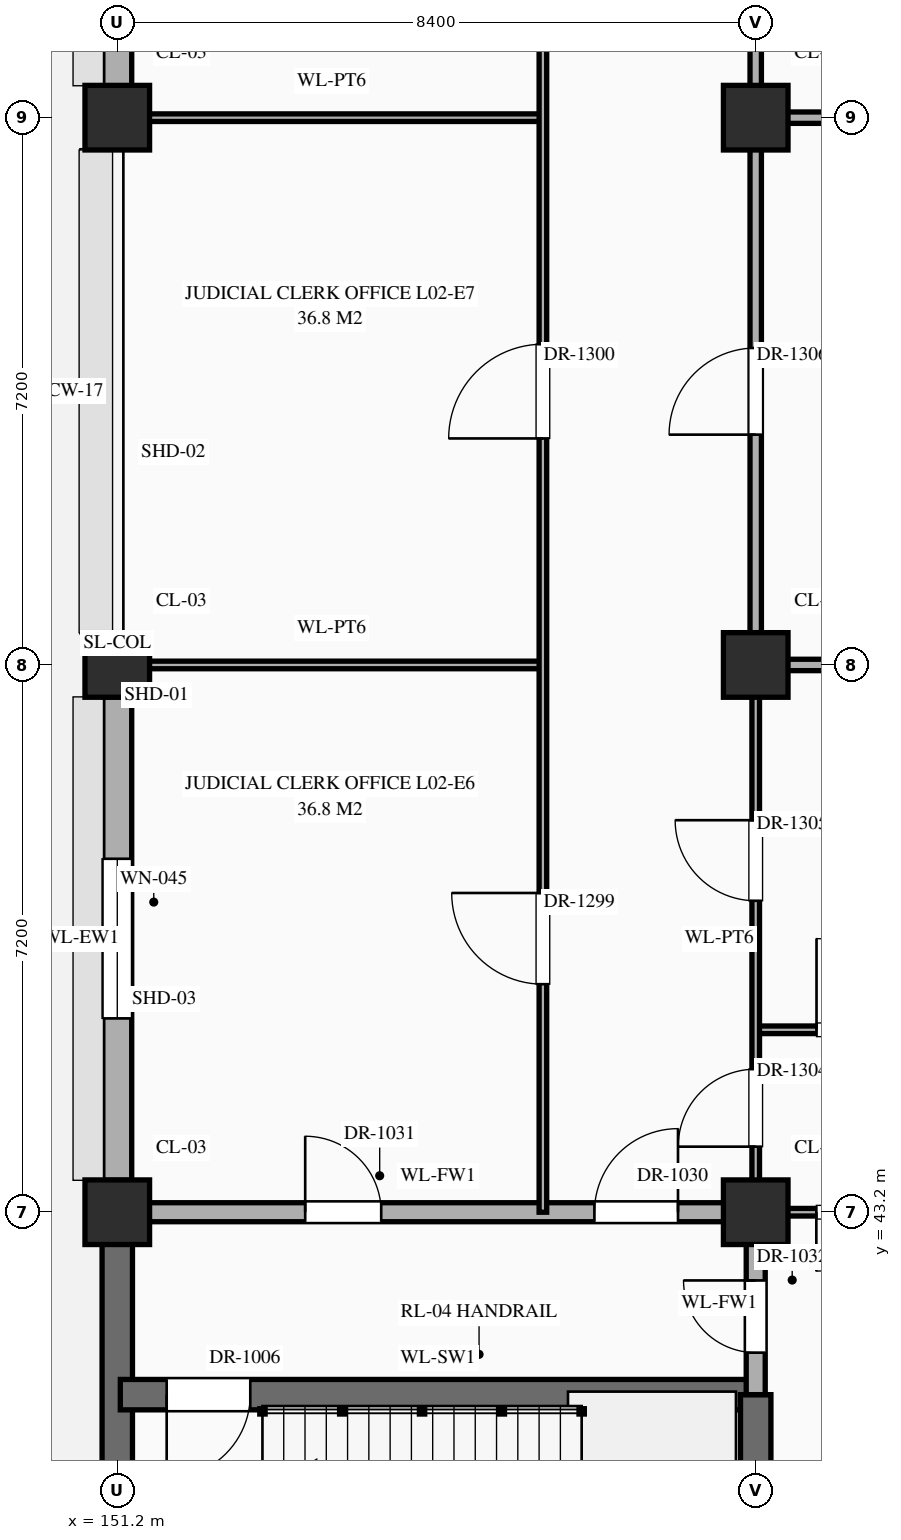
"""IFC4 building model, lengths in metres.
Left out: names, types, materials, properties, quantities, classifications, styles, units other than length and angle.
Written with IfcOpenShell. Run it as: python <this file> out.ifc"""

import sys

from ifc_helpers import new_model, si_unit, direction, frame, frame_2d, origin, origin_2d, place, context, subcontext, project, spatial, rectangle, extrude, element, fill, save


model = new_model("IFC4")
c1 = context("Model", 3, precision=1e-05, world=origin(), true_north=direction((0.0, 1.0)))
c2 = subcontext(c1, "Body", "Model", "MODEL_VIEW")
j1 = project(units=[si_unit("LENGTHUNIT", "METRE"), si_unit("PLANEANGLEUNIT", "RADIAN")], contexts=[c1])
p1 = place(None, origin())
s1 = spatial("IfcSite", under=j1, at=p1, CompositionType="ELEMENT")
p2 = place(p1, origin())
s2 = spatial("IfcBuilding", under=s1, at=p2, CompositionType="ELEMENT")
p3 = place(p2, frame((0.0, 0.0, 5.4)))
s3 = spatial("IfcBuildingStorey", under=s2, at=p3, CompositionType="ELEMENT", Elevation=5.4)
for number, where, z_axis, x_axis in (
    (1, (151.2, 43.2, 0.0), (0.0, 0.0, 1.0), (1.0, 0.0, 0.0)),
    (2, (151.2, 50.4, 0.0), (0.0, 0.0, 1.0), (1.0, 0.0, 0.0)),
    (3, (151.2, 57.6, 0.0), (0.0, 0.0, 1.0), (1.0, 0.0, 0.0)),
    (4, (159.6, 43.2, 0.0), (0.0, 0.0, 1.0), (1.0, 0.0, 0.0)),
    (5, (159.6, 50.4, 0.0), (0.0, 0.0, 1.0), (1.0, 0.0, 0.0)),
    (6, (159.6, 57.6, 0.0), (0.0, 0.0, 1.0), (1.0, 0.0, 0.0)),
):
    element("IfcColumn", number, at=place(p3, frame(where, z_axis=z_axis, x_axis=x_axis)), inside=s3, PredefinedType="COLUMN", context=c2, shape_type="SweptSolid", body=[
        extrude(rectangle(XDim=0.85, YDim=0.85, at=origin_2d()), origin(), (0.0, 0.0, 1.0), 5.4),
    ])
p4 = place(p3, frame((151.2, 36.42, 0.0), z_axis=(0.0, 0.0, 1.0), x_axis=(0.0, 1.0, 0.0)))
e7 = element("IfcWall", 7, at=p4, inside=s3, PredefinedType="SHEAR", context=c2, shape_type="SweptSolid", body=[
    extrude(rectangle(XDim=6.36, YDim=0.4, at=frame_2d((3.18, 0.0))), origin(), (0.0, 0.0, 1.0), 5.12),
])
p5 = place(p3, frame((151.2, 43.62, 0.0), z_axis=(0.0, 0.0, 1.0), x_axis=(0.0, 1.0, 0.0)))
e8 = element("IfcWall", 8, at=p5, inside=s3, PredefinedType="STANDARD", context=c2, shape_type="SweptSolid", body=[
    extrude(rectangle(XDim=6.36, YDim=0.38, at=frame_2d((3.18, 0.0))), origin(), (0.0, 0.0, 1.0), 4.47),
])
p6 = place(p5, frame((2.13, 0.0, 0.85)))
e9 = element("IfcOpeningElement", 9, at=p6, cuts=e8, PredefinedType="OPENING", context=c2, shape_type="SweptSolid", body=[
    extrude(rectangle(XDim=2.1, YDim=1.56, at=frame_2d((1.05, 0.78))), frame((0.0, 0.202, 0.0), z_axis=(0.0, -1.0, 0.0), x_axis=(1.0, 0.0, 0.0)), (0.0, 0.0, 1.0), 0.404),
])
p7 = place(p3, frame((151.2, 58.02, 0.0), z_axis=(0.0, 0.0, 1.0), x_axis=(0.0, 1.0, 0.0)))
e10 = element("IfcWall", 10, at=p7, inside=s3, PredefinedType="STANDARD", context=c2, shape_type="SweptSolid", body=[
    extrude(rectangle(XDim=6.36, YDim=0.38, at=frame_2d((3.18, 0.0))), origin(), (0.0, 0.0, 1.0), 4.47),
])
p8 = place(p7, frame((2.13, 0.0, 0.85)))
e11 = element("IfcOpeningElement", 11, at=p8, cuts=e10, PredefinedType="OPENING", context=c2, shape_type="SweptSolid", body=[
    extrude(rectangle(XDim=2.1, YDim=1.92, at=frame_2d((1.05, 0.96))), frame((0.0, 0.202, 0.0), z_axis=(0.0, -1.0, 0.0), x_axis=(1.0, 0.0, 0.0)), (0.0, 0.0, 1.0), 0.404),
])
p9 = place(p3, frame((151.24, 40.8, 0.0), z_axis=(0.0, 0.0, 1.0), x_axis=(1.0, 0.0, 0.0)))
e12 = element("IfcWall", 12, at=p9, inside=s3, PredefinedType="SHEAR", context=c2, shape_type="SweptSolid", body=[
    extrude(rectangle(XDim=8.36, YDim=0.4, at=frame_2d((4.18, 0.0))), origin(), (0.0, 0.0, 1.0), 5.12),
])
p10 = place(p9, frame((0.61, 0.0, 0.0)))
e13 = element("IfcOpeningElement", 13, at=p10, cuts=e12, PredefinedType="OPENING", context=c2, shape_type="SweptSolid", body=[
    extrude(rectangle(XDim=1.1, YDim=2.2, at=frame_2d((0.55, 1.1))), frame((0.0, 0.212, 0.0), z_axis=(0.0, -1.0, 0.0), x_axis=(1.0, 0.0, 0.0)), (0.0, 0.0, 1.0), 0.424),
])
p11 = place(p3, frame((151.24, 43.2, 0.0), z_axis=(0.0, 0.0, 1.0), x_axis=(1.0, 0.0, 0.0)))
e14 = element("IfcWall", 14, at=p11, inside=s3, PredefinedType="STANDARD", context=c2, shape_type="SweptSolid", body=[
    extrude(rectangle(XDim=8.36, YDim=0.25, at=frame_2d((4.18, 0.0))), origin(), (0.0, 0.0, 1.0), 4.27),
])
p12 = place(p11, frame((6.238, 0.0, 0.0)))
e15 = element("IfcOpeningElement", 15, at=p12, cuts=e14, PredefinedType="OPENING", context=c2, shape_type="SweptSolid", body=[
    extrude(rectangle(XDim=1.1, YDim=2.2, at=frame_2d((0.55, 1.1))), frame((0.0, 0.137, 0.0), z_axis=(0.0, -1.0, 0.0), x_axis=(1.0, 0.0, 0.0)), (0.0, 0.0, 1.0), 0.274),
])
p13 = place(p11, frame((2.433, 0.0, 0.0)))
e16 = element("IfcOpeningElement", 16, at=p13, cuts=e14, PredefinedType="OPENING", context=c2, shape_type="SweptSolid", body=[
    extrude(rectangle(XDim=1.0, YDim=2.2, at=frame_2d((0.5, 1.1))), frame((0.0, 0.137, 0.0), z_axis=(0.0, -1.0, 0.0), x_axis=(1.0, 0.0, 0.0)), (0.0, 0.0, 1.0), 0.274),
])
p14 = place(p3, frame((159.6, 43.2, 0.0), z_axis=(0.0, 0.0, 1.0), x_axis=(1.0, 0.0, 0.0)))
e17 = element("IfcWall", 17, at=p14, inside=s3, PredefinedType="STANDARD", context=c2, shape_type="SweptSolid", body=[
    extrude(rectangle(XDim=8.36, YDim=0.1, at=frame_2d((4.18, 0.0))), origin(), (0.0, 0.0, 1.0), 4.27),
])
p15 = place(p14, frame((0.798, 0.0, 0.0)))
e18 = element("IfcOpeningElement", 18, at=p15, cuts=e17, PredefinedType="OPENING", context=c2, shape_type="SweptSolid", body=[
    extrude(rectangle(XDim=1.55, YDim=2.35, at=frame_2d((0.775, 1.175))), frame((0.0, 0.062, 0.0), z_axis=(0.0, -1.0, 0.0), x_axis=(1.0, 0.0, 0.0)), (0.0, 0.0, 1.0), 0.124),
])
p16 = place(p3, frame((159.6, 45.6, 0.0), z_axis=(0.0, 0.0, 1.0), x_axis=(1.0, 0.0, 0.0)))
e19 = element("IfcWall", 19, at=p16, inside=s3, PredefinedType="STANDARD", context=c2, shape_type="SweptSolid", body=[
    extrude(rectangle(XDim=8.36, YDim=0.1, at=frame_2d((4.18, 0.0))), origin(), (0.0, 0.0, 1.0), 5.12),
])
p17 = place(p16, frame((0.8, 0.0, 0.0)))
e20 = element("IfcOpeningElement", 20, at=p17, cuts=e19, PredefinedType="OPENING", context=c2, shape_type="SweptSolid", body=[
    extrude(rectangle(XDim=1.2, YDim=2.35, at=frame_2d((0.6, 1.175))), frame((0.0, 0.062, 0.0), z_axis=(0.0, -1.0, 0.0), x_axis=(1.0, 0.0, 0.0)), (0.0, 0.0, 1.0), 0.124),
])
p18 = place(p3, frame((151.24, 50.4, 0.0), z_axis=(0.0, 0.0, 1.0), x_axis=(1.0, 0.0, 0.0)))
e21 = element("IfcWall", 21, at=p18, inside=s3, PredefinedType="STANDARD", context=c2, shape_type="SweptSolid", body=[
    extrude(rectangle(XDim=5.56, YDim=0.1, at=frame_2d((2.78, 0.0))), origin(), (0.0, 0.0, 1.0), 4.27),
])
p19 = place(p3, frame((159.6, 50.4, 0.0), z_axis=(0.0, 0.0, 1.0), x_axis=(1.0, 0.0, 0.0)))
e22 = element("IfcWall", 22, at=p19, inside=s3, PredefinedType="STANDARD", context=c2, shape_type="SweptSolid", body=[
    extrude(rectangle(XDim=8.36, YDim=0.15, at=frame_2d((4.18, 0.0))), origin(), (0.0, 0.0, 1.0), 4.27),
])
p20 = place(p3, frame((151.24, 57.6, 0.0), z_axis=(0.0, 0.0, 1.0), x_axis=(1.0, 0.0, 0.0)))
e23 = element("IfcWall", 23, at=p20, inside=s3, PredefinedType="STANDARD", context=c2, shape_type="SweptSolid", body=[
    extrude(rectangle(XDim=5.56, YDim=0.1, at=frame_2d((2.78, 0.0))), origin(), (0.0, 0.0, 1.0), 4.27),
])
p21 = place(p3, frame((159.6, 57.6, 0.0), z_axis=(0.0, 0.0, 1.0), x_axis=(1.0, 0.0, 0.0)))
e24 = element("IfcWall", 24, at=p21, inside=s3, PredefinedType="STANDARD", context=c2, shape_type="SweptSolid", body=[
    extrude(rectangle(XDim=8.36, YDim=0.15, at=frame_2d((4.18, 0.0))), origin(), (0.0, 0.0, 1.0), 4.27),
])
p22 = place(p3, frame((156.8, 43.2, 0.0), z_axis=(0.0, 0.0, 1.0), x_axis=(0.0, 1.0, 0.0)))
e25 = element("IfcWall", 25, at=p22, inside=s3, PredefinedType="STANDARD", context=c2, shape_type="SweptSolid", body=[
    extrude(rectangle(XDim=40.8, YDim=0.1, at=frame_2d((20.4, 0.0))), origin(), (0.0, 0.0, 1.0), 5.12),
])
p23 = place(p22, frame((37.95, 0.0, 0.0)))
e26 = element("IfcOpeningElement", 26, at=p23, cuts=e25, PredefinedType="OPENING", context=c2, shape_type="SweptSolid", body=[
    extrude(rectangle(XDim=0.9, YDim=2.15, at=frame_2d((0.45, 1.075))), frame((0.0, 0.062, 0.0), z_axis=(0.0, -1.0, 0.0), x_axis=(1.0, 0.0, 0.0)), (0.0, 0.0, 1.0), 0.124),
])
p24 = place(p22, frame((3.0, 0.0, 0.0)))
e27 = element("IfcOpeningElement", 27, at=p24, cuts=e25, PredefinedType="OPENING", context=c2, shape_type="SweptSolid", body=[
    extrude(rectangle(XDim=1.2, YDim=2.35, at=frame_2d((0.6, 1.175))), frame((0.0, 0.062, 0.0), z_axis=(0.0, -1.0, 0.0), x_axis=(1.0, 0.0, 0.0)), (0.0, 0.0, 1.0), 0.124),
])
p25 = place(p22, frame((10.18, 0.0, 0.0)))
e28 = element("IfcOpeningElement", 28, at=p25, cuts=e25, PredefinedType="OPENING", context=c2, shape_type="SweptSolid", body=[
    extrude(rectangle(XDim=1.24, YDim=2.3, at=frame_2d((0.62, 1.15))), frame((0.0, 0.062, 0.0), z_axis=(0.0, -1.0, 0.0), x_axis=(1.0, 0.0, 0.0)), (0.0, 0.0, 1.0), 0.124),
])
p26 = place(p22, frame((17.36, 0.0, 0.0)))
e29 = element("IfcOpeningElement", 29, at=p26, cuts=e25, PredefinedType="OPENING", context=c2, shape_type="SweptSolid", body=[
    extrude(rectangle(XDim=1.28, YDim=2.35, at=frame_2d((0.64, 1.175))), frame((0.0, 0.062, 0.0), z_axis=(0.0, -1.0, 0.0), x_axis=(1.0, 0.0, 0.0)), (0.0, 0.0, 1.0), 0.124),
])
p27 = place(p22, frame((24.73, 0.0, 0.0)))
e30 = element("IfcOpeningElement", 30, at=p27, cuts=e25, PredefinedType="OPENING", context=c2, shape_type="SweptSolid", body=[
    extrude(rectangle(XDim=0.94, YDim=2.3, at=frame_2d((0.47, 1.15))), frame((0.0, 0.062, 0.0), z_axis=(0.0, -1.0, 0.0), x_axis=(1.0, 0.0, 0.0)), (0.0, 0.0, 1.0), 0.124),
])
p28 = place(p22, frame((31.91, 0.0, 0.0)))
e31 = element("IfcOpeningElement", 31, at=p28, cuts=e25, PredefinedType="OPENING", context=c2, shape_type="SweptSolid", body=[
    extrude(rectangle(XDim=0.98, YDim=2.35, at=frame_2d((0.49, 1.175))), frame((0.0, 0.062, 0.0), z_axis=(0.0, -1.0, 0.0), x_axis=(1.0, 0.0, 0.0)), (0.0, 0.0, 1.0), 0.124),
])
p29 = place(p3, frame((159.6, 36.0, 0.0), z_axis=(0.0, 0.0, 1.0), x_axis=(0.0, 1.0, 0.0)))
e32 = element("IfcWall", 32, at=p29, inside=s3, PredefinedType="SHEAR", context=c2, shape_type="SweptSolid", body=[
    extrude(rectangle(XDim=4.8, YDim=0.4, at=frame_2d((2.4, 0.0))), origin(), (0.0, 0.0, 1.0), 5.12),
])
p30 = place(p3, frame((159.6, 40.8, 0.0), z_axis=(0.0, 0.0, 1.0), x_axis=(0.0, 1.0, 0.0)))
e33 = element("IfcWall", 33, at=p30, inside=s3, PredefinedType="STANDARD", context=c2, shape_type="SweptSolid", body=[
    extrude(rectangle(XDim=2.4, YDim=0.25, at=frame_2d((1.2, 0.0))), origin(), (0.0, 0.0, 1.0), 4.37),
])
p31 = place(p30, frame((0.552, 0.0, 0.0)))
e34 = element("IfcOpeningElement", 34, at=p31, cuts=e33, PredefinedType="OPENING", context=c2, shape_type="SweptSolid", body=[
    extrude(rectangle(XDim=0.95, YDim=2.15, at=frame_2d((0.475, 1.075))), frame((0.0, 0.137, 0.0), z_axis=(0.0, -1.0, 0.0), x_axis=(1.0, 0.0, 0.0)), (0.0, 0.0, 1.0), 0.274),
])
p32 = place(p3, frame((159.6, 43.2, 0.0), z_axis=(0.0, 0.0, 1.0), x_axis=(0.0, 1.0, 0.0)))
e35 = element("IfcWall", 35, at=p32, inside=s3, PredefinedType="STANDARD", context=c2, shape_type="SweptSolid", body=[
    extrude(rectangle(XDim=7.2, YDim=0.1, at=frame_2d((3.6, 0.0))), origin(), (0.0, 0.0, 1.0), 4.37),
])
p33 = place(p32, frame((0.863, 0.0, 0.0)))
e36 = element("IfcOpeningElement", 36, at=p33, cuts=e35, PredefinedType="OPENING", context=c2, shape_type="SweptSolid", body=[
    extrude(rectangle(XDim=1.02, YDim=2.4, at=frame_2d((0.51, 1.2))), frame((0.0, 0.062, 0.0), z_axis=(0.0, -1.0, 0.0), x_axis=(1.0, 0.0, 0.0)), (0.0, 0.0, 1.0), 0.124),
])
p34 = place(p32, frame((4.097, 0.0, 0.0)))
e37 = element("IfcOpeningElement", 37, at=p34, cuts=e35, PredefinedType="OPENING", context=c2, shape_type="SweptSolid", body=[
    extrude(rectangle(XDim=1.06, YDim=2.4, at=frame_2d((0.53, 1.2))), frame((0.0, 0.062, 0.0), z_axis=(0.0, -1.0, 0.0), x_axis=(1.0, 0.0, 0.0)), (0.0, 0.0, 1.0), 0.124),
])
p35 = place(p3, frame((159.6, 50.4, 0.0), z_axis=(0.0, 0.0, 1.0), x_axis=(0.0, 1.0, 0.0)))
e38 = element("IfcWall", 38, at=p35, inside=s3, PredefinedType="STANDARD", context=c2, shape_type="SweptSolid", body=[
    extrude(rectangle(XDim=33.6, YDim=0.15, at=frame_2d((16.8, 0.0))), origin(), (0.0, 0.0, 1.0), 4.37),
])
p36 = place(p35, frame((30.942, 0.0, 0.0)))
e39 = element("IfcOpeningElement", 39, at=p36, cuts=e38, PredefinedType="OPENING", context=c2, shape_type="SweptSolid", body=[
    extrude(rectangle(XDim=0.86, YDim=2.1, at=frame_2d((0.43, 1.05))), frame((0.0, 0.087, 0.0), z_axis=(0.0, -1.0, 0.0), x_axis=(1.0, 0.0, 0.0)), (0.0, 0.0, 1.0), 0.174),
])
p37 = place(p35, frame((3.03, 0.0, 0.0)))
e40 = element("IfcOpeningElement", 40, at=p37, cuts=e38, PredefinedType="OPENING", context=c2, shape_type="SweptSolid", body=[
    extrude(rectangle(XDim=1.14, YDim=2.4, at=frame_2d((0.57, 1.2))), frame((0.0, 0.087, 0.0), z_axis=(0.0, -1.0, 0.0), x_axis=(1.0, 0.0, 0.0)), (0.0, 0.0, 1.0), 0.174),
])
p38 = place(p35, frame((10.35, 0.0, 0.0)))
e41 = element("IfcOpeningElement", 41, at=p38, cuts=e38, PredefinedType="OPENING", context=c2, shape_type="SweptSolid", body=[
    extrude(rectangle(XDim=0.9, YDim=2.15, at=frame_2d((0.45, 1.075))), frame((0.0, 0.087, 0.0), z_axis=(0.0, -1.0, 0.0), x_axis=(1.0, 0.0, 0.0)), (0.0, 0.0, 1.0), 0.174),
])
p39 = place(p35, frame((17.57, 0.0, 0.0)))
e42 = element("IfcOpeningElement", 42, at=p39, cuts=e38, PredefinedType="OPENING", context=c2, shape_type="SweptSolid", body=[
    extrude(rectangle(XDim=0.86, YDim=2.1, at=frame_2d((0.43, 1.05))), frame((0.0, 0.087, 0.0), z_axis=(0.0, -1.0, 0.0), x_axis=(1.0, 0.0, 0.0)), (0.0, 0.0, 1.0), 0.174),
])
p40 = place(p35, frame((24.74, 0.0, 0.0)))
e43 = element("IfcOpeningElement", 43, at=p40, cuts=e38, PredefinedType="OPENING", context=c2, shape_type="SweptSolid", body=[
    extrude(rectangle(XDim=0.92, YDim=2.15, at=frame_2d((0.46, 1.075))), frame((0.0, 0.087, 0.0), z_axis=(0.0, -1.0, 0.0), x_axis=(1.0, 0.0, 0.0)), (0.0, 0.0, 1.0), 0.174),
])
p41 = place(p6, origin())
e44 = element("IfcWindow", 44, at=p41, inside=s3, PartitioningType="SINGLE_PANEL", PredefinedType="WINDOW", context=c2, shape_type="SweptSolid", body=[
    extrude(rectangle(XDim=2.1, YDim=1.56, at=frame_2d((1.05, 0.78))), frame((0.0, 0.03, 0.0), z_axis=(0.0, -1.0, 0.0), x_axis=(1.0, 0.0, 0.0)), (0.0, 0.0, 1.0), 0.06),
])
fill(e9, e44)
p42 = place(p10, frame((1.1, 0.0, 0.0), z_axis=(0.0, 0.0, 1.0), x_axis=(-1.0, 0.0, 0.0)))
e45 = element("IfcDoor", 45, at=p42, inside=s3, OperationType="SINGLE_SWING_RIGHT", PredefinedType="DOOR", context=c2, shape_type="SweptSolid", body=[
    extrude(rectangle(XDim=1.1, YDim=2.2, at=frame_2d((0.55, 1.1))), frame((0.0, 0.025, 0.0), z_axis=(0.0, -1.0, 0.0), x_axis=(1.0, 0.0, 0.0)), (0.0, 0.0, 1.0), 0.05),
])
fill(e13, e45)
p43 = place(p12, origin())
e46 = element("IfcDoor", 46, at=p43, inside=s3, OperationType="SINGLE_SWING_RIGHT", PredefinedType="DOOR", context=c2, shape_type="SweptSolid", body=[
    extrude(rectangle(XDim=1.1, YDim=2.2, at=frame_2d((0.55, 1.1))), frame((0.0, 0.025, 0.0), z_axis=(0.0, -1.0, 0.0), x_axis=(1.0, 0.0, 0.0)), (0.0, 0.0, 1.0), 0.05),
])
fill(e15, e46)
p44 = place(p13, origin())
e47 = element("IfcDoor", 47, at=p44, inside=s3, OperationType="SINGLE_SWING_LEFT", PredefinedType="DOOR", context=c2, shape_type="SweptSolid", body=[
    extrude(rectangle(XDim=1.0, YDim=2.2, at=frame_2d((0.5, 1.1))), frame((0.0, 0.025, 0.0), z_axis=(0.0, -1.0, 0.0), x_axis=(1.0, 0.0, 0.0)), (0.0, 0.0, 1.0), 0.05),
])
fill(e16, e47)
p45 = place(p31, origin())
e48 = element("IfcDoor", 48, at=p45, inside=s3, OperationType="SINGLE_SWING_RIGHT", PredefinedType="DOOR", context=c2, shape_type="SweptSolid", body=[
    extrude(rectangle(XDim=0.95, YDim=2.15, at=frame_2d((0.475, 1.075))), frame((0.0, 0.025, 0.0), z_axis=(0.0, -1.0, 0.0), x_axis=(1.0, 0.0, 0.0)), (0.0, 0.0, 1.0), 0.05),
])
fill(e34, e48)
p46 = place(p24, origin())
e49 = element("IfcDoor", 49, at=p46, inside=s3, OperationType="SINGLE_SWING_RIGHT", PredefinedType="DOOR", context=c2, shape_type="SweptSolid", body=[
    extrude(rectangle(XDim=1.2, YDim=2.35, at=frame_2d((0.6, 1.175))), frame((0.0, 0.025, 0.0), z_axis=(0.0, -1.0, 0.0), x_axis=(1.0, 0.0, 0.0)), (0.0, 0.0, 1.0), 0.05),
])
fill(e27, e49)
p47 = place(p25, origin())
e50 = element("IfcDoor", 50, at=p47, inside=s3, OperationType="SINGLE_SWING_LEFT", PredefinedType="DOOR", context=c2, shape_type="SweptSolid", body=[
    extrude(rectangle(XDim=1.24, YDim=2.3, at=frame_2d((0.62, 1.15))), frame((0.0, 0.025, 0.0), z_axis=(0.0, -1.0, 0.0), x_axis=(1.0, 0.0, 0.0)), (0.0, 0.0, 1.0), 0.05),
])
fill(e28, e50)
p48 = place(p33, origin())
e51 = element("IfcDoor", 51, at=p48, inside=s3, OperationType="SINGLE_SWING_LEFT", PredefinedType="DOOR", context=c2, shape_type="SweptSolid", body=[
    extrude(rectangle(XDim=1.02, YDim=2.4, at=frame_2d((0.51, 1.2))), frame((0.0, 0.025, 0.0), z_axis=(0.0, -1.0, 0.0), x_axis=(1.0, 0.0, 0.0)), (0.0, 0.0, 1.0), 0.05),
])
fill(e36, e51)
p49 = place(p34, origin())
e52 = element("IfcDoor", 52, at=p49, inside=s3, OperationType="SINGLE_SWING_RIGHT", PredefinedType="DOOR", context=c2, shape_type="SweptSolid", body=[
    extrude(rectangle(XDim=1.06, YDim=2.4, at=frame_2d((0.53, 1.2))), frame((0.0, 0.025, 0.0), z_axis=(0.0, -1.0, 0.0), x_axis=(1.0, 0.0, 0.0)), (0.0, 0.0, 1.0), 0.05),
])
fill(e37, e52)
p50 = place(p37, origin())
e53 = element("IfcDoor", 53, at=p50, inside=s3, OperationType="SINGLE_SWING_LEFT", PredefinedType="DOOR", context=c2, shape_type="SweptSolid", body=[
    extrude(rectangle(XDim=1.14, YDim=2.4, at=frame_2d((0.57, 1.2))), frame((0.0, 0.025, 0.0), z_axis=(0.0, -1.0, 0.0), x_axis=(1.0, 0.0, 0.0)), (0.0, 0.0, 1.0), 0.05),
])
fill(e40, e53)
p51 = place(p15, frame((1.55, 0.0, 0.0), z_axis=(0.0, 0.0, 1.0), x_axis=(-1.0, 0.0, 0.0)))
e54 = element("IfcDoor", 54, at=p51, inside=s3, OperationType="DOUBLE_DOOR_SINGLE_SWING", PredefinedType="DOOR", context=c2, shape_type="SweptSolid", body=[
    extrude(rectangle(XDim=1.55, YDim=2.35, at=frame_2d((0.775, 1.175))), frame((0.0, 0.025, 0.0), z_axis=(0.0, -1.0, 0.0), x_axis=(1.0, 0.0, 0.0)), (0.0, 0.0, 1.0), 0.05),
])
fill(e18, e54)
p52 = place(p17, origin())
e55 = element("IfcDoor", 55, at=p52, inside=s3, OperationType="SINGLE_SWING_LEFT", PredefinedType="DOOR", context=c2, shape_type="SweptSolid", body=[
    extrude(rectangle(XDim=1.2, YDim=2.35, at=frame_2d((0.6, 1.175))), frame((0.0, 0.025, 0.0), z_axis=(0.0, -1.0, 0.0), x_axis=(1.0, 0.0, 0.0)), (0.0, 0.0, 1.0), 0.05),
])
fill(e20, e55)
save(model, sys.argv[1])
